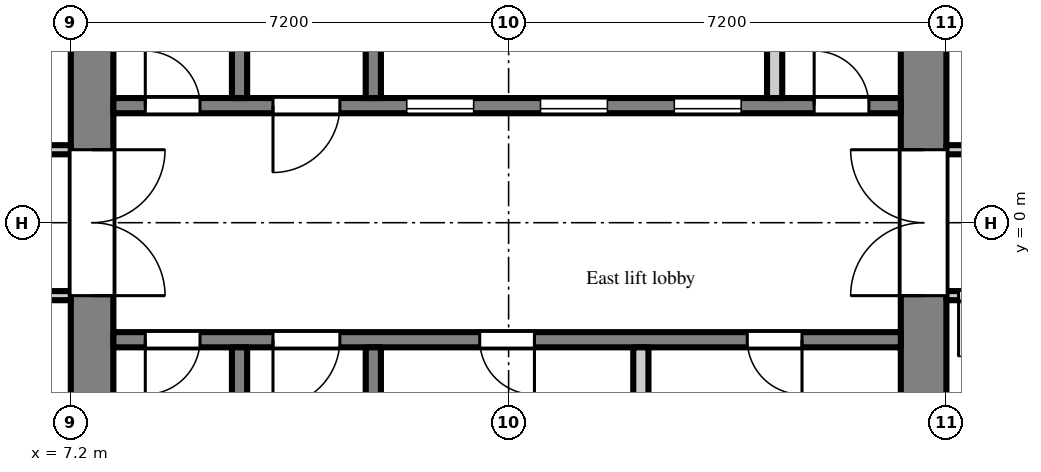
"""IFC4 building model, lengths in metres.
Left out: names, types, materials, properties, quantities, classifications, styles, units other than length and angle.
Written with IfcOpenShell. Run it as: python <this file> out.ifc"""

import sys

from ifc_helpers import new_model, si_unit, direction, frame, frame_2d, origin, place, context, subcontext, project, spatial, rectangle, extrude, element, fill, save


model = new_model("IFC4")
c1 = context("Model", 3, precision=1e-05, world=origin(), true_north=direction((0.0, 1.0)))
c2 = subcontext(c1, "Body", "Model", "MODEL_VIEW")
j1 = project(units=[si_unit("LENGTHUNIT", "METRE"), si_unit("PLANEANGLEUNIT", "RADIAN")], contexts=[c1])
p1 = place(None, origin())
s1 = spatial("IfcSite", under=j1, at=p1, CompositionType="ELEMENT")
p2 = place(p1, origin())
s2 = spatial("IfcBuilding", under=s1, at=p2, CompositionType="ELEMENT")
p3 = place(p2, frame((0.0, 0.0, 225.9)))
s3 = spatial("IfcBuildingStorey", under=s2, at=p3, CompositionType="ELEMENT", Elevation=225.9)
p4 = place(p3, frame((7.55, -7.2, 0.0), z_axis=(0.0, 0.0, 1.0), x_axis=(0.0, 1.0, 0.0)))
e1 = element("IfcWall", 1, at=p4, inside=s3, PredefinedType="SHEAR", context=c2, shape_type="SweptSolid", body=[
    extrude(rectangle(XDim=14.4, YDim=0.7, at=frame_2d((7.2, 0.0))), origin(), (0.0, 0.0, 1.0), 2.6),
])
p5 = place(p4, frame((6.0, 0.0, 0.0)))
e2 = element("IfcOpeningElement", 2, at=p5, cuts=e1, PredefinedType="OPENING", context=c2, shape_type="SweptSolid", body=[
    extrude(rectangle(XDim=2.4, YDim=2.2, at=frame_2d((1.2, 1.1))), frame((0.0, 0.36, 0.0), z_axis=(0.0, -1.0, 0.0), x_axis=(1.0, 0.0, 0.0)), (0.0, 0.0, 1.0), 0.72),
])
p6 = place(p3, frame((21.225, -7.2, 0.0), z_axis=(0.0, 0.0, 1.0), x_axis=(0.0, 1.0, 0.0)))
e3 = element("IfcWall", 3, at=p6, inside=s3, PredefinedType="SHEAR", context=c2, shape_type="SweptSolid", body=[
    extrude(rectangle(XDim=14.4, YDim=0.75, at=frame_2d((7.2, 0.0))), origin(), (0.0, 0.0, 1.0), 2.6),
])
p7 = place(p6, frame((6.0, 0.0, 0.0)))
e4 = element("IfcOpeningElement", 4, at=p7, cuts=e3, PredefinedType="OPENING", context=c2, shape_type="SweptSolid", body=[
    extrude(rectangle(XDim=2.4, YDim=2.2, at=frame_2d((1.2, 1.1))), frame((0.0, 0.385, 0.0), z_axis=(0.0, -1.0, 0.0), x_axis=(1.0, 0.0, 0.0)), (0.0, 0.0, 1.0), 0.77),
])
p8 = place(p3, frame((7.9, 1.925, 0.0), z_axis=(0.0, 0.0, 1.0), x_axis=(1.0, 0.0, 0.0)))
e5 = element("IfcWall", 5, at=p8, inside=s3, PredefinedType="SHEAR", context=c2, shape_type="SweptSolid", body=[
    extrude(rectangle(XDim=12.95, YDim=0.25, at=frame_2d((6.475, 0.0))), origin(), (0.0, 0.0, 1.0), 2.6),
])
p9 = place(p8, frame((4.825, 0.0, 0.0)))
e6 = element("IfcOpeningElement", 6, at=p9, cuts=e5, PredefinedType="OPENING", context=c2, shape_type="SweptSolid", body=[
    extrude(rectangle(XDim=1.1, YDim=2.1, at=frame_2d((0.55, 1.05))), frame((0.0, 0.135, 0.0), z_axis=(0.0, -1.0, 0.0), x_axis=(1.0, 0.0, 0.0)), (0.0, 0.0, 1.0), 0.27),
])
p10 = place(p8, frame((7.025, 0.0, 0.0)))
e7 = element("IfcOpeningElement", 7, at=p10, cuts=e5, PredefinedType="OPENING", context=c2, shape_type="SweptSolid", body=[
    extrude(rectangle(XDim=1.1, YDim=2.1, at=frame_2d((0.55, 1.05))), frame((0.0, 0.135, 0.0), z_axis=(0.0, -1.0, 0.0), x_axis=(1.0, 0.0, 0.0)), (0.0, 0.0, 1.0), 0.27),
])
p11 = place(p8, frame((9.225, 0.0, 0.0)))
e8 = element("IfcOpeningElement", 8, at=p11, cuts=e5, PredefinedType="OPENING", context=c2, shape_type="SweptSolid", body=[
    extrude(rectangle(XDim=1.1, YDim=2.1, at=frame_2d((0.55, 1.05))), frame((0.0, 0.135, 0.0), z_axis=(0.0, -1.0, 0.0), x_axis=(1.0, 0.0, 0.0)), (0.0, 0.0, 1.0), 0.27),
])
p12 = place(p8, frame((0.525, 0.0, 0.0)))
e9 = element("IfcOpeningElement", 9, at=p12, cuts=e5, PredefinedType="OPENING", context=c2, shape_type="SweptSolid", body=[
    extrude(rectangle(XDim=0.9, YDim=2.1, at=frame_2d((0.45, 1.05))), frame((0.0, 0.135, 0.0), z_axis=(0.0, -1.0, 0.0), x_axis=(1.0, 0.0, 0.0)), (0.0, 0.0, 1.0), 0.27),
])
p13 = place(p8, frame((2.625, 0.0, 0.0)))
e10 = element("IfcOpeningElement", 10, at=p13, cuts=e5, PredefinedType="OPENING", context=c2, shape_type="SweptSolid", body=[
    extrude(rectangle(XDim=1.1, YDim=2.1, at=frame_2d((0.55, 1.05))), frame((0.0, 0.135, 0.0), z_axis=(0.0, -1.0, 0.0), x_axis=(1.0, 0.0, 0.0)), (0.0, 0.0, 1.0), 0.27),
])
p14 = place(p8, frame((11.525, 0.0, 0.0)))
e11 = element("IfcOpeningElement", 11, at=p14, cuts=e5, PredefinedType="OPENING", context=c2, shape_type="SweptSolid", body=[
    extrude(rectangle(XDim=0.9, YDim=2.1, at=frame_2d((0.45, 1.05))), frame((0.0, 0.135, 0.0), z_axis=(0.0, -1.0, 0.0), x_axis=(1.0, 0.0, 0.0)), (0.0, 0.0, 1.0), 0.27),
])
p15 = place(p3, frame((9.975, 2.05, 0.0), z_axis=(0.0, 0.0, 1.0), x_axis=(0.0, 1.0, 0.0)))
e12 = element("IfcWall", 12, at=p15, inside=s3, PredefinedType="SHEAR", context=c2, shape_type="SweptSolid", body=[
    extrude(rectangle(XDim=4.75, YDim=0.25, at=frame_2d((2.375, 0.0))), origin(), (0.0, 0.0, 1.0), 2.6),
])
p16 = place(p15, frame((2.95, 0.0, 0.0)))
e13 = element("IfcOpeningElement", 13, at=p16, cuts=e12, PredefinedType="OPENING", context=c2, shape_type="SweptSolid", body=[
    extrude(rectangle(XDim=1.1, YDim=2.1, at=frame_2d((0.55, 1.05))), frame((0.0, 0.135, 0.0), z_axis=(0.0, -1.0, 0.0), x_axis=(1.0, 0.0, 0.0)), (0.0, 0.0, 1.0), 0.27),
])
p17 = place(p3, frame((12.175, 2.05, 0.0), z_axis=(0.0, 0.0, 1.0), x_axis=(0.0, 1.0, 0.0)))
e14 = element("IfcWall", 14, at=p17, inside=s3, PredefinedType="SHEAR", context=c2, shape_type="SweptSolid", body=[
    extrude(rectangle(XDim=4.75, YDim=0.25, at=frame_2d((2.375, 0.0))), origin(), (0.0, 0.0, 1.0), 2.6),
])
p18 = place(p17, frame((3.0, 0.0, 0.0)))
e15 = element("IfcOpeningElement", 15, at=p18, cuts=e14, PredefinedType="OPENING", context=c2, shape_type="SweptSolid", body=[
    extrude(rectangle(XDim=1.1, YDim=2.1, at=frame_2d((0.55, 1.05))), frame((0.0, 0.135, 0.0), z_axis=(0.0, -1.0, 0.0), x_axis=(1.0, 0.0, 0.0)), (0.0, 0.0, 1.0), 0.27),
])
p19 = place(p3, frame((18.775, 2.05, 0.0), z_axis=(0.0, 0.0, 1.0), x_axis=(0.0, 1.0, 0.0)))
e16 = element("IfcWall", 16, at=p19, inside=s3, PredefinedType="PARTITIONING", context=c2, shape_type="SweptSolid", body=[
    extrude(rectangle(XDim=2.1, YDim=0.25, at=frame_2d((1.05, 0.0))), origin(), (0.0, 0.0, 1.0), 2.6),
])
p20 = place(p3, frame((7.9, -1.925, 0.0), z_axis=(0.0, 0.0, 1.0), x_axis=(1.0, 0.0, 0.0)))
e17 = element("IfcWall", 17, at=p20, inside=s3, PredefinedType="SHEAR", context=c2, shape_type="SweptSolid", body=[
    extrude(rectangle(XDim=12.95, YDim=0.25, at=frame_2d((6.475, 0.0))), origin(), (0.0, 0.0, 1.0), 2.6),
])
p21 = place(p20, frame((0.525, 0.0, 0.0)))
e18 = element("IfcOpeningElement", 18, at=p21, cuts=e17, PredefinedType="OPENING", context=c2, shape_type="SweptSolid", body=[
    extrude(rectangle(XDim=0.9, YDim=2.1, at=frame_2d((0.45, 1.05))), frame((0.0, 0.135, 0.0), z_axis=(0.0, -1.0, 0.0), x_axis=(1.0, 0.0, 0.0)), (0.0, 0.0, 1.0), 0.27),
])
p22 = place(p20, frame((2.625, 0.0, 0.0)))
e19 = element("IfcOpeningElement", 19, at=p22, cuts=e17, PredefinedType="OPENING", context=c2, shape_type="SweptSolid", body=[
    extrude(rectangle(XDim=1.1, YDim=2.1, at=frame_2d((0.55, 1.05))), frame((0.0, 0.135, 0.0), z_axis=(0.0, -1.0, 0.0), x_axis=(1.0, 0.0, 0.0)), (0.0, 0.0, 1.0), 0.27),
])
p23 = place(p20, frame((6.025, 0.0, 0.0)))
e20 = element("IfcOpeningElement", 20, at=p23, cuts=e17, PredefinedType="OPENING", context=c2, shape_type="SweptSolid", body=[
    extrude(rectangle(XDim=0.9, YDim=2.1, at=frame_2d((0.45, 1.05))), frame((0.0, 0.135, 0.0), z_axis=(0.0, -1.0, 0.0), x_axis=(1.0, 0.0, 0.0)), (0.0, 0.0, 1.0), 0.27),
])
p24 = place(p20, frame((10.425, 0.0, 0.0)))
e21 = element("IfcOpeningElement", 21, at=p24, cuts=e17, PredefinedType="OPENING", context=c2, shape_type="SweptSolid", body=[
    extrude(rectangle(XDim=0.9, YDim=2.1, at=frame_2d((0.45, 1.05))), frame((0.0, 0.135, 0.0), z_axis=(0.0, -1.0, 0.0), x_axis=(1.0, 0.0, 0.0)), (0.0, 0.0, 1.0), 0.27),
])
p25 = place(p3, frame((9.975, -2.05, 0.0), z_axis=(0.0, 0.0, 1.0), x_axis=(0.0, -1.0, 0.0)))
e22 = element("IfcWall", 22, at=p25, inside=s3, PredefinedType="SHEAR", context=c2, shape_type="SweptSolid", body=[
    extrude(rectangle(XDim=4.75, YDim=0.25, at=frame_2d((2.375, 0.0))), origin(), (0.0, 0.0, 1.0), 2.6),
])
p26 = place(p25, frame((2.95, 0.0, 0.0)))
e23 = element("IfcOpeningElement", 23, at=p26, cuts=e22, PredefinedType="OPENING", context=c2, shape_type="SweptSolid", body=[
    extrude(rectangle(XDim=1.1, YDim=2.1, at=frame_2d((0.55, 1.05))), frame((0.0, 0.135, 0.0), z_axis=(0.0, -1.0, 0.0), x_axis=(1.0, 0.0, 0.0)), (0.0, 0.0, 1.0), 0.27),
])
p27 = place(p3, frame((12.175, -2.05, 0.0), z_axis=(0.0, 0.0, 1.0), x_axis=(0.0, -1.0, 0.0)))
e24 = element("IfcWall", 24, at=p27, inside=s3, PredefinedType="SHEAR", context=c2, shape_type="SweptSolid", body=[
    extrude(rectangle(XDim=4.75, YDim=0.25, at=frame_2d((2.375, 0.0))), origin(), (0.0, 0.0, 1.0), 2.6),
])
p28 = place(p27, frame((3.0, 0.0, 0.0)))
e25 = element("IfcOpeningElement", 25, at=p28, cuts=e24, PredefinedType="OPENING", context=c2, shape_type="SweptSolid", body=[
    extrude(rectangle(XDim=1.1, YDim=2.1, at=frame_2d((0.55, 1.05))), frame((0.0, 0.135, 0.0), z_axis=(0.0, -1.0, 0.0), x_axis=(1.0, 0.0, 0.0)), (0.0, 0.0, 1.0), 0.27),
])
p29 = place(p3, frame((16.575, -2.05, 0.0), z_axis=(0.0, 0.0, 1.0), x_axis=(0.0, -1.0, 0.0)))
e26 = element("IfcWall", 26, at=p29, inside=s3, PredefinedType="PARTITIONING", context=c2, shape_type="SweptSolid", body=[
    extrude(rectangle(XDim=2.1, YDim=0.25, at=frame_2d((1.05, 0.0))), origin(), (0.0, 0.0, 1.0), 2.6),
])
p30 = place(p3, frame((1.275, -1.2, 0.0), z_axis=(0.0, 0.0, 1.0), x_axis=(1.0, 0.0, 0.0)))
e27 = element("IfcWall", 27, at=p30, inside=s3, PredefinedType="PARTITIONING", context=c2, shape_type="SweptSolid", body=[
    extrude(rectangle(XDim=5.925, YDim=0.15, at=frame_2d((2.962, 0.0))), origin(), (0.0, 0.0, 1.0), 2.6),
])
p31 = place(p30, frame((3.475, 0.0, 0.0)))
e28 = element("IfcOpeningElement", 28, at=p31, cuts=e27, PredefinedType="OPENING", context=c2, shape_type="SweptSolid", body=[
    extrude(rectangle(XDim=0.9, YDim=2.1, at=frame_2d((0.45, 1.05))), frame((0.0, 0.085, 0.0), z_axis=(0.0, -1.0, 0.0), x_axis=(1.0, 0.0, 0.0)), (0.0, 0.0, 1.0), 0.17),
])
p32 = place(p3, frame((1.275, 1.2, 0.0), z_axis=(0.0, 0.0, 1.0), x_axis=(1.0, 0.0, 0.0)))
e29 = element("IfcWall", 29, at=p32, inside=s3, PredefinedType="PARTITIONING", context=c2, shape_type="SweptSolid", body=[
    extrude(rectangle(XDim=5.925, YDim=0.15, at=frame_2d((2.962, 0.0))), origin(), (0.0, 0.0, 1.0), 2.6),
])
p33 = place(p32, frame((4.475, 0.0, 0.0)))
e30 = element("IfcOpeningElement", 30, at=p33, cuts=e29, PredefinedType="OPENING", context=c2, shape_type="SweptSolid", body=[
    extrude(rectangle(XDim=0.9, YDim=2.1, at=frame_2d((0.45, 1.05))), frame((0.0, 0.085, 0.0), z_axis=(0.0, -1.0, 0.0), x_axis=(1.0, 0.0, 0.0)), (0.0, 0.0, 1.0), 0.17),
])
p34 = place(p3, frame((21.6, -1.2, 0.0), z_axis=(0.0, 0.0, 1.0), x_axis=(1.0, 0.0, 0.0)))
e31 = element("IfcWall", 31, at=p34, inside=s3, PredefinedType="PARTITIONING", context=c2, shape_type="SweptSolid", body=[
    extrude(rectangle(XDim=5.125, YDim=0.15, at=frame_2d((2.562, 0.0))), origin(), (0.0, 0.0, 1.0), 2.6),
])
p35 = place(p34, frame((0.2, 0.0, 0.0)))
e32 = element("IfcOpeningElement", 32, at=p35, cuts=e31, PredefinedType="OPENING", context=c2, shape_type="SweptSolid", body=[
    extrude(rectangle(XDim=1.0, YDim=2.1, at=frame_2d((0.5, 1.05))), frame((0.0, 0.085, 0.0), z_axis=(0.0, -1.0, 0.0), x_axis=(1.0, 0.0, 0.0)), (0.0, 0.0, 1.0), 0.17),
])
p36 = place(p3, frame((21.6, 1.2, 0.0), z_axis=(0.0, 0.0, 1.0), x_axis=(1.0, 0.0, 0.0)))
e33 = element("IfcWall", 33, at=p36, inside=s3, PredefinedType="PARTITIONING", context=c2, shape_type="SweptSolid", body=[
    extrude(rectangle(XDim=5.125, YDim=0.15, at=frame_2d((2.562, 0.0))), origin(), (0.0, 0.0, 1.0), 2.6),
])
p37 = place(p36, frame((0.6, 0.0, 0.0)))
e34 = element("IfcOpeningElement", 34, at=p37, cuts=e33, PredefinedType="OPENING", context=c2, shape_type="SweptSolid", body=[
    extrude(rectangle(XDim=1.0, YDim=2.1, at=frame_2d((0.5, 1.05))), frame((0.0, 0.085, 0.0), z_axis=(0.0, -1.0, 0.0), x_axis=(1.0, 0.0, 0.0)), (0.0, 0.0, 1.0), 0.17),
])
p38 = place(p9, origin())
e35 = element("IfcDoor", 35, at=p38, inside=s3, OperationType="SLIDING_TO_LEFT", PredefinedType="DOOR", context=c2, shape_type="SweptSolid", body=[
    extrude(rectangle(XDim=1.1, YDim=2.1, at=frame_2d((0.55, 1.05))), frame((0.0, 0.025, 0.0), z_axis=(0.0, -1.0, 0.0), x_axis=(1.0, 0.0, 0.0)), (0.0, 0.0, 1.0), 0.05),
])
fill(e6, e35)
p39 = place(p10, origin())
e36 = element("IfcDoor", 36, at=p39, inside=s3, OperationType="SLIDING_TO_LEFT", PredefinedType="DOOR", context=c2, shape_type="SweptSolid", body=[
    extrude(rectangle(XDim=1.1, YDim=2.1, at=frame_2d((0.55, 1.05))), frame((0.0, 0.025, 0.0), z_axis=(0.0, -1.0, 0.0), x_axis=(1.0, 0.0, 0.0)), (0.0, 0.0, 1.0), 0.05),
])
fill(e7, e36)
p40 = place(p11, origin())
e37 = element("IfcDoor", 37, at=p40, inside=s3, OperationType="SLIDING_TO_LEFT", PredefinedType="DOOR", context=c2, shape_type="SweptSolid", body=[
    extrude(rectangle(XDim=1.1, YDim=2.1, at=frame_2d((0.55, 1.05))), frame((0.0, 0.025, 0.0), z_axis=(0.0, -1.0, 0.0), x_axis=(1.0, 0.0, 0.0)), (0.0, 0.0, 1.0), 0.05),
])
fill(e8, e37)
p41 = place(p12, origin())
e38 = element("IfcDoor", 38, at=p41, inside=s3, OperationType="SINGLE_SWING_LEFT", PredefinedType="DOOR", context=c2, shape_type="SweptSolid", body=[
    extrude(rectangle(XDim=0.9, YDim=2.1, at=frame_2d((0.45, 1.05))), frame((0.0, 0.025, 0.0), z_axis=(0.0, -1.0, 0.0), x_axis=(1.0, 0.0, 0.0)), (0.0, 0.0, 1.0), 0.05),
])
fill(e9, e38)
p42 = place(p21, frame((0.9, 0.0, 0.0), z_axis=(0.0, 0.0, 1.0), x_axis=(-1.0, 0.0, 0.0)))
e39 = element("IfcDoor", 39, at=p42, inside=s3, OperationType="SINGLE_SWING_RIGHT", PredefinedType="DOOR", context=c2, shape_type="SweptSolid", body=[
    extrude(rectangle(XDim=0.9, YDim=2.1, at=frame_2d((0.45, 1.05))), frame((0.0, 0.025, 0.0), z_axis=(0.0, -1.0, 0.0), x_axis=(1.0, 0.0, 0.0)), (0.0, 0.0, 1.0), 0.05),
])
fill(e18, e39)
p43 = place(p13, frame((1.1, 0.0, 0.0), z_axis=(0.0, 0.0, 1.0), x_axis=(-1.0, 0.0, 0.0)))
e40 = element("IfcDoor", 40, at=p43, inside=s3, OperationType="SINGLE_SWING_RIGHT", PredefinedType="DOOR", context=c2, shape_type="SweptSolid", body=[
    extrude(rectangle(XDim=1.1, YDim=2.1, at=frame_2d((0.55, 1.05))), frame((0.0, 0.025, 0.0), z_axis=(0.0, -1.0, 0.0), x_axis=(1.0, 0.0, 0.0)), (0.0, 0.0, 1.0), 0.05),
])
fill(e10, e40)
p44 = place(p22, frame((1.1, 0.0, 0.0), z_axis=(0.0, 0.0, 1.0), x_axis=(-1.0, 0.0, 0.0)))
e41 = element("IfcDoor", 41, at=p44, inside=s3, OperationType="SINGLE_SWING_RIGHT", PredefinedType="DOOR", context=c2, shape_type="SweptSolid", body=[
    extrude(rectangle(XDim=1.1, YDim=2.1, at=frame_2d((0.55, 1.05))), frame((0.0, 0.025, 0.0), z_axis=(0.0, -1.0, 0.0), x_axis=(1.0, 0.0, 0.0)), (0.0, 0.0, 1.0), 0.05),
])
fill(e19, e41)
p45 = place(p5, frame((2.4, 0.0, 0.0), z_axis=(0.0, 0.0, 1.0), x_axis=(-1.0, 0.0, 0.0)))
e42 = element("IfcDoor", 42, at=p45, inside=s3, OperationType="DOUBLE_DOOR_DOUBLE_SWING", PredefinedType="DOOR", context=c2, shape_type="SweptSolid", body=[
    extrude(rectangle(XDim=2.4, YDim=2.2, at=frame_2d((1.2, 1.1))), frame((0.0, 0.025, 0.0), z_axis=(0.0, -1.0, 0.0), x_axis=(1.0, 0.0, 0.0)), (0.0, 0.0, 1.0), 0.05),
])
fill(e2, e42)
p46 = place(p7, origin())
e43 = element("IfcDoor", 43, at=p46, inside=s3, OperationType="DOUBLE_DOOR_DOUBLE_SWING", PredefinedType="DOOR", context=c2, shape_type="SweptSolid", body=[
    extrude(rectangle(XDim=2.4, YDim=2.2, at=frame_2d((1.2, 1.1))), frame((0.0, 0.025, 0.0), z_axis=(0.0, -1.0, 0.0), x_axis=(1.0, 0.0, 0.0)), (0.0, 0.0, 1.0), 0.05),
])
fill(e4, e43)
p47 = place(p14, origin())
e44 = element("IfcDoor", 44, at=p47, inside=s3, OperationType="SINGLE_SWING_LEFT", PredefinedType="DOOR", context=c2, shape_type="SweptSolid", body=[
    extrude(rectangle(XDim=0.9, YDim=2.1, at=frame_2d((0.45, 1.05))), frame((0.0, 0.025, 0.0), z_axis=(0.0, -1.0, 0.0), x_axis=(1.0, 0.0, 0.0)), (0.0, 0.0, 1.0), 0.05),
])
fill(e11, e44)
p48 = place(p23, frame((0.9, 0.0, 0.0), z_axis=(0.0, 0.0, 1.0), x_axis=(-1.0, 0.0, 0.0)))
e45 = element("IfcDoor", 45, at=p48, inside=s3, OperationType="SINGLE_SWING_LEFT", PredefinedType="DOOR", context=c2, shape_type="SweptSolid", body=[
    extrude(rectangle(XDim=0.9, YDim=2.1, at=frame_2d((0.45, 1.05))), frame((0.0, 0.025, 0.0), z_axis=(0.0, -1.0, 0.0), x_axis=(1.0, 0.0, 0.0)), (0.0, 0.0, 1.0), 0.05),
])
fill(e20, e45)
p49 = place(p24, frame((0.9, 0.0, 0.0), z_axis=(0.0, 0.0, 1.0), x_axis=(-1.0, 0.0, 0.0)))
e46 = element("IfcDoor", 46, at=p49, inside=s3, OperationType="SINGLE_SWING_LEFT", PredefinedType="DOOR", context=c2, shape_type="SweptSolid", body=[
    extrude(rectangle(XDim=0.9, YDim=2.1, at=frame_2d((0.45, 1.05))), frame((0.0, 0.025, 0.0), z_axis=(0.0, -1.0, 0.0), x_axis=(1.0, 0.0, 0.0)), (0.0, 0.0, 1.0), 0.05),
])
fill(e21, e46)
p50 = place(p35, frame((1.0, 0.0, 0.0), z_axis=(0.0, 0.0, 1.0), x_axis=(-1.0, 0.0, 0.0)))
e47 = element("IfcDoor", 47, at=p50, inside=s3, OperationType="SINGLE_SWING_RIGHT", PredefinedType="DOOR", context=c2, shape_type="SweptSolid", body=[
    extrude(rectangle(XDim=1.0, YDim=2.1, at=frame_2d((0.5, 1.05))), frame((0.0, 0.025, 0.0), z_axis=(0.0, -1.0, 0.0), x_axis=(1.0, 0.0, 0.0)), (0.0, 0.0, 1.0), 0.05),
])
fill(e32, e47)
save(model, sys.argv[1])
